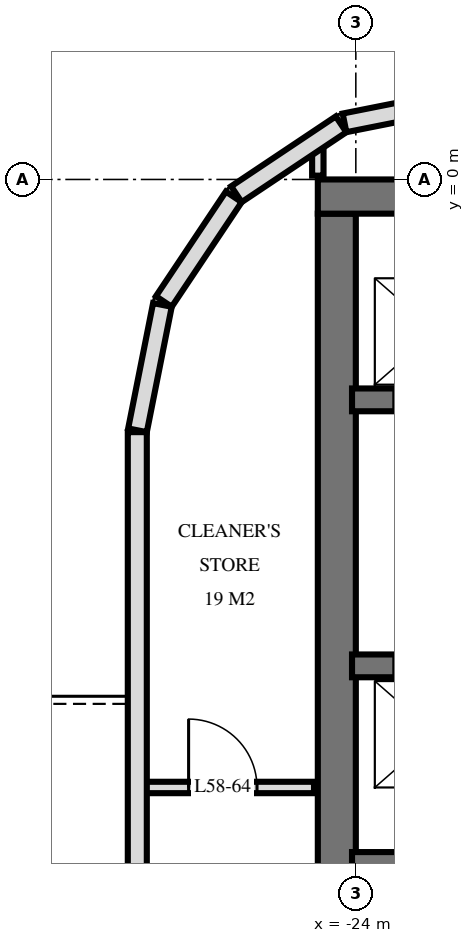
"""IFC4 building model, lengths in metres.
Left out: names, types, materials, properties, quantities, classifications, styles, units other than length and angle.
Written with IfcOpenShell. Run it as: python <this file> out.ifc"""

import sys

from ifc_helpers import new_model, si_unit, direction, frame, frame_2d, origin, place, context, subcontext, project, spatial, rectangle, extrude, element, fill, save


model = new_model("IFC4")
c1 = context("Model", 3, precision=1e-05, world=origin(), true_north=direction((0.0, 1.0)))
c2 = subcontext(c1, "Body", "Model", "MODEL_VIEW")
j1 = project(units=[si_unit("LENGTHUNIT", "METRE"), si_unit("PLANEANGLEUNIT", "RADIAN")], contexts=[c1])
p1 = place(None, origin())
s1 = spatial("IfcSite", under=j1, at=p1, CompositionType="ELEMENT")
p2 = place(p1, origin())
s2 = spatial("IfcBuilding", under=s1, at=p2, CompositionType="ELEMENT")
p3 = place(p2, frame((0.0, 0.0, 222.1)))
s3 = spatial("IfcBuildingStorey", under=s2, at=p3, CompositionType="ELEMENT", Elevation=222.1)
p4 = place(p3, frame((-24.5, -0.225, 0.0), z_axis=(0.0, 0.0, 1.0), x_axis=(1.0, 0.0, 0.0)))
e1 = element("IfcWall", 1, at=p4, inside=s3, PredefinedType="SHEAR", context=c2, shape_type="SweptSolid", body=[
    extrude(rectangle(XDim=14.5, YDim=0.45, at=frame_2d((7.25, 0.0))), origin(), (0.0, 0.0, 1.0), 3.5),
])
p5 = place(p3, frame((-24.25, -14.55, 0.0), z_axis=(0.0, 0.0, 1.0), x_axis=(0.0, 1.0, 0.0)))
e2 = element("IfcWall", 2, at=p5, inside=s3, PredefinedType="SHEAR", context=c2, shape_type="SweptSolid", body=[
    extrude(rectangle(XDim=14.1, YDim=0.5, at=frame_2d((7.05, 0.0))), origin(), (0.0, 0.0, 1.0), 3.5),
])
p6 = place(p3, frame((-24.05, -2.9, 0.0), z_axis=(0.0, 0.0, 1.0), x_axis=(1.0, 0.0, 0.0)))
e3 = element("IfcWall", 3, at=p6, inside=s3, PredefinedType="SHEAR", context=c2, shape_type="SweptSolid", body=[
    extrude(rectangle(XDim=13.7, YDim=0.3, at=frame_2d((6.85, 0.0))), origin(), (0.0, 0.0, 1.0), 3.5),
])
p7 = place(p6, frame((0.55, 0.0, 0.0)))
e4 = element("IfcOpeningElement", 4, at=p7, cuts=e3, PredefinedType="OPENING", context=c2, shape_type="SweptSolid", body=[
    extrude(rectangle(XDim=1.1, YDim=2.1, at=frame_2d((0.55, 1.05))), frame((0.0, 0.16, 0.0), z_axis=(0.0, -1.0, 0.0), x_axis=(1.0, 0.0, 0.0)), (0.0, 0.0, 1.0), 0.32),
])
p8 = place(p6, frame((5.9, 0.0, 0.0)))
e5 = element("IfcOpeningElement", 5, at=p8, cuts=e3, PredefinedType="OPENING", context=c2, shape_type="SweptSolid", body=[
    extrude(rectangle(XDim=0.9, YDim=2.1, at=frame_2d((0.45, 1.05))), frame((0.0, 0.16, 0.0), z_axis=(0.0, -1.0, 0.0), x_axis=(1.0, 0.0, 0.0)), (0.0, 0.0, 1.0), 0.32),
])
p9 = place(p6, frame((11.85, 0.0, 0.0)))
e6 = element("IfcOpeningElement", 6, at=p9, cuts=e3, PredefinedType="OPENING", context=c2, shape_type="SweptSolid", body=[
    extrude(rectangle(XDim=1.0, YDim=2.1, at=frame_2d((0.5, 1.05))), frame((0.0, 0.16, 0.0), z_axis=(0.0, -1.0, 0.0), x_axis=(1.0, 0.0, 0.0)), (0.0, 0.0, 1.0), 0.32),
])
p10 = place(p6, frame((9.312, 0.0, 0.0)))
e7 = element("IfcOpeningElement", 7, at=p10, cuts=e3, PredefinedType="OPENING", context=c2, shape_type="SweptSolid", body=[
    extrude(rectangle(XDim=1.0, YDim=2.1, at=frame_2d((0.5, 1.05))), frame((0.0, 0.16, 0.0), z_axis=(0.0, -1.0, 0.0), x_axis=(1.0, 0.0, 0.0)), (0.0, 0.0, 1.0), 0.32),
])
p11 = place(p6, frame((7.887, 0.0, 0.0)))
e8 = element("IfcOpeningElement", 8, at=p11, cuts=e3, PredefinedType="OPENING", context=c2, shape_type="SweptSolid", body=[
    extrude(rectangle(XDim=1.0, YDim=2.1, at=frame_2d((0.5, 1.05))), frame((0.0, 0.16, 0.0), z_axis=(0.0, -1.0, 0.0), x_axis=(1.0, 0.0, 0.0)), (0.0, 0.0, 1.0), 0.32),
])
p12 = place(p6, frame((3.0, 0.0, 0.0)))
e9 = element("IfcOpeningElement", 9, at=p12, cuts=e3, PredefinedType="OPENING", context=c2, shape_type="SweptSolid", body=[
    extrude(rectangle(XDim=1.0, YDim=2.1, at=frame_2d((0.5, 1.05))), frame((0.0, 0.16, 0.0), z_axis=(0.0, -1.0, 0.0), x_axis=(1.0, 0.0, 0.0)), (0.0, 0.0, 1.0), 0.32),
])
p13 = place(p3, frame((-24.05, -6.4, 0.0), z_axis=(0.0, 0.0, 1.0), x_axis=(1.0, 0.0, 0.0)))
e10 = element("IfcWall", 10, at=p13, inside=s3, PredefinedType="SHEAR", context=c2, shape_type="SweptSolid", body=[
    extrude(rectangle(XDim=13.7, YDim=0.3, at=frame_2d((6.85, 0.0))), origin(), (0.0, 0.0, 1.0), 3.5),
])
p14 = place(p13, frame((0.55, 0.0, 0.0)))
e11 = element("IfcOpeningElement", 11, at=p14, cuts=e10, PredefinedType="OPENING", context=c2, shape_type="SweptSolid", body=[
    extrude(rectangle(XDim=1.1, YDim=2.1, at=frame_2d((0.55, 1.05))), frame((0.0, 0.16, 0.0), z_axis=(0.0, -1.0, 0.0), x_axis=(1.0, 0.0, 0.0)), (0.0, 0.0, 1.0), 0.32),
])
p15 = place(p13, frame((5.8, 0.0, 0.0)))
e12 = element("IfcOpeningElement", 12, at=p15, cuts=e10, PredefinedType="OPENING", context=c2, shape_type="SweptSolid", body=[
    extrude(rectangle(XDim=1.1, YDim=2.1, at=frame_2d((0.55, 1.05))), frame((0.0, 0.16, 0.0), z_axis=(0.0, -1.0, 0.0), x_axis=(1.0, 0.0, 0.0)), (0.0, 0.0, 1.0), 0.32),
])
p16 = place(p3, frame((-24.05, -9.0, 0.0), z_axis=(0.0, 0.0, 1.0), x_axis=(1.0, 0.0, 0.0)))
e13 = element("IfcWall", 13, at=p16, inside=s3, PredefinedType="SHEAR", context=c2, shape_type="SweptSolid", body=[
    extrude(rectangle(XDim=13.7, YDim=0.3, at=frame_2d((6.85, 0.0))), origin(), (0.0, 0.0, 1.0), 3.5),
])
p17 = place(p16, frame((8.8, 0.0, 0.0)))
e14 = element("IfcOpeningElement", 14, at=p17, cuts=e13, PredefinedType="OPENING", context=c2, shape_type="SweptSolid", body=[
    extrude(rectangle(XDim=1.1, YDim=2.1, at=frame_2d((0.55, 1.05))), frame((0.0, 0.16, 0.0), z_axis=(0.0, -1.0, 0.0), x_axis=(1.0, 0.0, 0.0)), (0.0, 0.0, 1.0), 0.32),
])
p18 = place(p3, frame((-22.5, 1.073, 0.0), z_axis=(0.0, 0.0, 1.0), x_axis=(-0.980803419081, -0.194999110559, 0.0)))
e15 = element("IfcWall", 15, at=p18, inside=s3, PredefinedType="SOLIDWALL", context=c2, shape_type="SweptSolid", body=[
    extrude(rectangle(XDim=1.681, YDim=0.25, at=frame_2d((0.841, 0.0))), origin(), (0.0, 0.0, 1.0), 3.22),
])
for number, where, z_axis, x_axis in (
    (16, (-24.194, 0.726, 0.0), (0.0, 0.0, 1.0), (-0.831, -0.556, 0.0)),
    (17, (-25.606, -0.229, 0.0), (0.0, 0.0, 1.0), (-0.556, -0.831, 0.0)),
):
    element("IfcWall", number, at=place(p3, frame(where, z_axis=z_axis, x_axis=x_axis)), inside=s3, PredefinedType="SOLIDWALL", context=c2, shape_type="SweptSolid", body=[
        extrude(rectangle(XDim=1.656, YDim=0.25, at=frame_2d((0.828, 0.0))), origin(), (0.0, 0.0, 1.0), 3.22),
    ])
p19 = place(p3, frame((-26.545, -1.651, 0.0), z_axis=(0.0, 0.0, 1.0), x_axis=(-0.194999110559, -0.980803419081, 0.0)))
e18 = element("IfcWall", 18, at=p19, inside=s3, PredefinedType="SOLIDWALL", context=c2, shape_type="SweptSolid", body=[
    extrude(rectangle(XDim=1.681, YDim=0.25, at=frame_2d((0.841, 0.0))), origin(), (0.0, 0.0, 1.0), 3.22),
])
p20 = place(p3, frame((-26.875, -3.325, 0.0), z_axis=(0.0, 0.0, 1.0), x_axis=(0.0, -1.0, 0.0)))
e19 = element("IfcWall", 19, at=p20, inside=s3, PredefinedType="SOLIDWALL", context=c2, shape_type="SweptSolid", body=[
    extrude(rectangle(XDim=21.551, YDim=0.25, at=frame_2d((10.775, 0.0))), origin(), (0.0, 0.0, 1.0), 3.22),
])
p21 = place(p20, frame((7.275, 0.0, 0.0)))
e20 = element("IfcOpeningElement", 20, at=p21, cuts=e19, PredefinedType="OPENING", context=c2, shape_type="SweptSolid", body=[
    extrude(rectangle(XDim=1.8, YDim=2.4, at=frame_2d((0.9, 1.2))), frame((0.0, 0.135, 0.0), z_axis=(0.0, -1.0, 0.0), x_axis=(1.0, 0.0, 0.0)), (0.0, 0.0, 1.0), 0.27),
])
p22 = place(p20, frame((15.275, 0.0, 0.0)))
e21 = element("IfcOpeningElement", 21, at=p22, cuts=e19, PredefinedType="OPENING", context=c2, shape_type="SweptSolid", body=[
    extrude(rectangle(XDim=1.8, YDim=2.4, at=frame_2d((0.9, 1.2))), frame((0.0, 0.135, 0.0), z_axis=(0.0, -1.0, 0.0), x_axis=(1.0, 0.0, 0.0)), (0.0, 0.0, 1.0), 0.27),
])
p23 = place(p20, frame((18.875, 0.0, 0.0)))
e22 = element("IfcOpeningElement", 22, at=p23, cuts=e19, PredefinedType="OPENING", context=c2, shape_type="SweptSolid", body=[
    extrude(rectangle(XDim=1.8, YDim=2.4, at=frame_2d((0.9, 1.2))), frame((0.0, 0.135, 0.0), z_axis=(0.0, -1.0, 0.0), x_axis=(1.0, 0.0, 0.0)), (0.0, 0.0, 1.0), 0.27),
])
p24 = place(p3, frame((-24.5, 0.05, 0.0), z_axis=(0.0, 0.0, 1.0), x_axis=(0.0, 1.0, 0.0)))
e23 = element("IfcWall", 23, at=p24, inside=s3, PredefinedType="PARTITIONING", context=c2, shape_type="SweptSolid", body=[
    extrude(rectangle(XDim=0.405, YDim=0.15, at=frame_2d((0.203, 0.0))), origin(), (0.0, 0.0, 1.0), 3.22),
])
p25 = place(p3, frame((-26.82, -8.0, 0.0), z_axis=(0.0, 0.0, 1.0), x_axis=(1.0, 0.0, 0.0)))
e24 = element("IfcWall", 24, at=p25, inside=s3, PredefinedType="PLUMBINGWALL", context=c2, shape_type="SweptSolid", body=[
    extrude(rectangle(XDim=2.27, YDim=0.15, at=frame_2d((1.135, 0.0))), origin(), (0.0, 0.0, 1.0), 3.22),
])
p26 = place(p25, frame((0.62, 0.0, 0.0)))
e25 = element("IfcOpeningElement", 25, at=p26, cuts=e24, PredefinedType="OPENING", context=c2, shape_type="SweptSolid", body=[
    extrude(rectangle(XDim=0.9, YDim=2.1, at=frame_2d((0.45, 1.05))), frame((0.0, 0.085, 0.0), z_axis=(0.0, -1.0, 0.0), x_axis=(1.0, 0.0, 0.0)), (0.0, 0.0, 1.0), 0.17),
])
p27 = place(p26, origin())
e26 = element("IfcDoor", 26, at=p27, inside=s3, OperationType="SINGLE_SWING_RIGHT", PredefinedType="DOOR", context=c2, shape_type="SweptSolid", body=[
    extrude(rectangle(XDim=0.9, YDim=2.1, at=frame_2d((0.45, 1.05))), frame((0.0, 0.025, 0.0), z_axis=(0.0, -1.0, 0.0), x_axis=(1.0, 0.0, 0.0)), (0.0, 0.0, 1.0), 0.05),
])
fill(e25, e26)
save(model, sys.argv[1])
